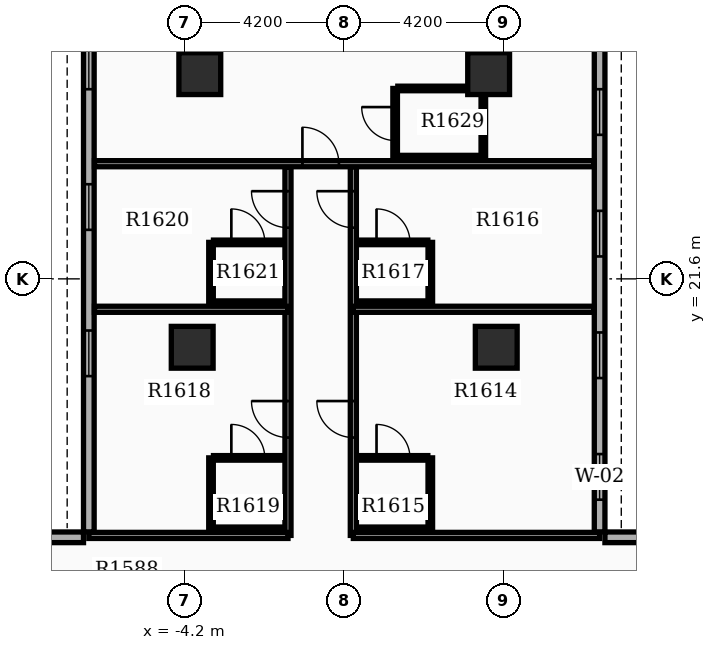
"""IFC4 building model, lengths in metres.
Left out: names, types, materials, properties, quantities, classifications, styles, units other than length and angle.
Written with IfcOpenShell. Run it as: python <this file> out.ifc"""

import sys

from ifc_helpers import new_model, si_unit, direction, frame, frame_2d, origin, origin_2d, place, context, subcontext, project, spatial, rectangle, extrude, element, fill, save


model = new_model("IFC4")
c1 = context("Model", 3, precision=1e-05, world=origin(), true_north=direction((0.0, 1.0)))
c2 = subcontext(c1, "Body", "Model", "MODEL_VIEW")
j1 = project(units=[si_unit("LENGTHUNIT", "METRE"), si_unit("PLANEANGLEUNIT", "RADIAN")], contexts=[c1])
p1 = place(None, origin())
s1 = spatial("IfcSite", under=j1, at=p1, CompositionType="ELEMENT")
p2 = place(p1, origin())
s2 = spatial("IfcBuilding", under=s1, at=p2, CompositionType="ELEMENT")
p3 = place(p2, frame((0.0, 0.0, 104.7)))
s3 = spatial("IfcBuildingStorey", under=s2, at=p3, CompositionType="ELEMENT", Elevation=104.7)
for number, where, z_axis, x_axis in (
    (1, (-4.0, 19.8, 0.0), (0.0, 0.0, 1.0), (1.0, 0.0, 0.0)),
    (2, (4.0, 19.8, 0.0), (0.0, 0.0, 1.0), (1.0, 0.0, 0.0)),
    (3, (-3.8, 27.0, 0.0), (0.0, 0.0, 1.0), (1.0, 0.0, 0.0)),
    (4, (3.8, 27.0, 0.0), (0.0, 0.0, 1.0), (1.0, 0.0, 0.0)),
):
    element("IfcColumn", number, at=place(p3, frame(where, z_axis=z_axis, x_axis=x_axis)), inside=s3, PredefinedType="COLUMN", context=c2, shape_type="SweptSolid", body=[
        extrude(rectangle(XDim=1.1, YDim=1.1, at=origin_2d()), origin(), (0.0, 0.0, 1.0), 3.9),
    ])
p4 = place(p3, frame((6.72, 14.94, 0.0), z_axis=(0.0, 0.0, 1.0), x_axis=(0.0, 1.0, 0.0)))
e5 = element("IfcWall", 5, at=p4, inside=s3, PredefinedType="STANDARD", context=c2, shape_type="SweptSolid", body=[
    extrude(rectangle(XDim=20.1, YDim=0.28, at=frame_2d((10.05, 0.0))), origin(), (0.0, 0.0, 1.0), 2.97),
])
p5 = place(p4, frame((0.85, 0.0, 0.8)))
e6 = element("IfcOpeningElement", 6, at=p5, cuts=e5, PredefinedType="OPENING", context=c2, shape_type="SweptSolid", body=[
    extrude(rectangle(XDim=1.2, YDim=1.6, at=frame_2d((0.6, 0.8))), frame((0.0, 0.15, 0.0), z_axis=(0.0, -1.0, 0.0), x_axis=(1.0, 0.0, 0.0)), (0.0, 0.0, 1.0), 0.3),
])
p6 = place(p4, frame((4.05, 0.0, 0.8)))
e7 = element("IfcOpeningElement", 7, at=p6, cuts=e5, PredefinedType="OPENING", context=c2, shape_type="SweptSolid", body=[
    extrude(rectangle(XDim=1.2, YDim=1.6, at=frame_2d((0.6, 0.8))), frame((0.0, 0.15, 0.0), z_axis=(0.0, -1.0, 0.0), x_axis=(1.0, 0.0, 0.0)), (0.0, 0.0, 1.0), 0.3),
])
p7 = place(p4, frame((7.25, 0.0, 0.8)))
e8 = element("IfcOpeningElement", 8, at=p7, cuts=e5, PredefinedType="OPENING", context=c2, shape_type="SweptSolid", body=[
    extrude(rectangle(XDim=1.2, YDim=1.6, at=frame_2d((0.6, 0.8))), frame((0.0, 0.15, 0.0), z_axis=(0.0, -1.0, 0.0), x_axis=(1.0, 0.0, 0.0)), (0.0, 0.0, 1.0), 0.3),
])
p8 = place(p4, frame((10.45, 0.0, 0.8)))
e9 = element("IfcOpeningElement", 9, at=p8, cuts=e5, PredefinedType="OPENING", context=c2, shape_type="SweptSolid", body=[
    extrude(rectangle(XDim=1.2, YDim=1.6, at=frame_2d((0.6, 0.8))), frame((0.0, 0.15, 0.0), z_axis=(0.0, -1.0, 0.0), x_axis=(1.0, 0.0, 0.0)), (0.0, 0.0, 1.0), 0.3),
])
p9 = place(p3, frame((-6.72, 35.04, 0.0), z_axis=(0.0, 0.0, 1.0), x_axis=(0.0, -1.0, 0.0)))
e10 = element("IfcWall", 10, at=p9, inside=s3, PredefinedType="STANDARD", context=c2, shape_type="SweptSolid", body=[
    extrude(rectangle(XDim=20.1, YDim=0.28, at=frame_2d((10.05, 0.0))), origin(), (0.0, 0.0, 1.0), 2.97),
])
p10 = place(p9, frame((0.85, 0.0, 0.8)))
e11 = element("IfcOpeningElement", 11, at=p10, cuts=e10, PredefinedType="OPENING", context=c2, shape_type="SweptSolid", body=[
    extrude(rectangle(XDim=1.2, YDim=1.6, at=frame_2d((0.6, 0.8))), frame((0.0, 0.15, 0.0), z_axis=(0.0, -1.0, 0.0), x_axis=(1.0, 0.0, 0.0)), (0.0, 0.0, 1.0), 0.3),
])
p11 = place(p9, frame((4.05, 0.0, 0.8)))
e12 = element("IfcOpeningElement", 12, at=p11, cuts=e10, PredefinedType="OPENING", context=c2, shape_type="SweptSolid", body=[
    extrude(rectangle(XDim=1.2, YDim=1.6, at=frame_2d((0.6, 0.8))), frame((0.0, 0.15, 0.0), z_axis=(0.0, -1.0, 0.0), x_axis=(1.0, 0.0, 0.0)), (0.0, 0.0, 1.0), 0.3),
])
p12 = place(p9, frame((7.25, 0.0, 0.8)))
e13 = element("IfcOpeningElement", 13, at=p12, cuts=e10, PredefinedType="OPENING", context=c2, shape_type="SweptSolid", body=[
    extrude(rectangle(XDim=1.2, YDim=1.6, at=frame_2d((0.6, 0.8))), frame((0.0, 0.15, 0.0), z_axis=(0.0, -1.0, 0.0), x_axis=(1.0, 0.0, 0.0)), (0.0, 0.0, 1.0), 0.3),
])
p13 = place(p9, frame((10.95, 0.0, 0.8)))
e14 = element("IfcOpeningElement", 14, at=p13, cuts=e10, PredefinedType="OPENING", context=c2, shape_type="SweptSolid", body=[
    extrude(rectangle(XDim=1.2, YDim=1.6, at=frame_2d((0.6, 0.8))), frame((0.0, 0.15, 0.0), z_axis=(0.0, -1.0, 0.0), x_axis=(1.0, 0.0, 0.0)), (0.0, 0.0, 1.0), 0.3),
])
p14 = place(p9, frame((14.799, 0.0, 0.85)))
e15 = element("IfcOpeningElement", 15, at=p14, cuts=e10, PredefinedType="OPENING", context=c2, shape_type="SweptSolid", body=[
    extrude(rectangle(XDim=1.2, YDim=1.6, at=frame_2d((0.6, 0.8))), frame((0.0, 0.15, 0.0), z_axis=(0.0, -1.0, 0.0), x_axis=(1.0, 0.0, 0.0)), (0.0, 0.0, 1.0), 0.3),
])
for number, where, z_axis, x_axis in (
    (16, (13.16, 14.8, 0.0), (0.0, 0.0, 1.0), (-1.0, 0.0, 0.0)),
    (17, (-13.16, 14.8, 0.0), (0.0, 0.0, 1.0), (1.0, 0.0, 0.0)),
):
    element("IfcWall", number, at=place(p3, frame(where, z_axis=z_axis, x_axis=x_axis)), inside=s3, PredefinedType="STANDARD", context=c2, shape_type="SweptSolid", body=[
        extrude(rectangle(XDim=6.3, YDim=0.28, at=frame_2d((3.15, 0.0))), origin(), (0.0, 0.0, 1.0), 2.97),
    ])
p15 = place(p3, frame((0.24, 14.85, 0.0), z_axis=(0.0, 0.0, 1.0), x_axis=(0.0, 1.0, 0.0)))
e18 = element("IfcWall", 18, at=p15, inside=s3, PredefinedType="PARTITIONING", context=c2, shape_type="SweptSolid", body=[
    extrude(rectangle(XDim=9.7, YDim=0.16, at=frame_2d((4.85, 0.0))), origin(), (0.0, 0.0, 1.0), 2.96),
])
p16 = place(p15, frame((2.575, 0.0, 0.0)))
e19 = element("IfcOpeningElement", 19, at=p16, cuts=e18, PredefinedType="OPENING", context=c2, shape_type="SweptSolid", body=[
    extrude(rectangle(XDim=0.96, YDim=2.15, at=frame_2d((0.48, 1.075))), frame((0.0, 0.09, 0.0), z_axis=(0.0, -1.0, 0.0), x_axis=(1.0, 0.0, 0.0)), (0.0, 0.0, 1.0), 0.18),
])
p17 = place(p15, frame((8.097, 0.0, 0.0)))
e20 = element("IfcOpeningElement", 20, at=p17, cuts=e18, PredefinedType="OPENING", context=c2, shape_type="SweptSolid", body=[
    extrude(rectangle(XDim=0.96, YDim=2.15, at=frame_2d((0.48, 1.075))), frame((0.0, 0.09, 0.0), z_axis=(0.0, -1.0, 0.0), x_axis=(1.0, 0.0, 0.0)), (0.0, 0.0, 1.0), 0.18),
])
p18 = place(p3, frame((0.24, 14.85, 0.0), z_axis=(0.0, 0.0, 1.0), x_axis=(1.0, 0.0, 0.0)))
e21 = element("IfcWall", 21, at=p18, inside=s3, PredefinedType="PARTITIONING", context=c2, shape_type="SweptSolid", body=[
    extrude(rectangle(XDim=6.48, YDim=0.16, at=frame_2d((3.24, 0.0))), origin(), (0.0, 0.0, 1.0), 2.96),
])
p19 = place(p3, frame((0.24, 20.8, 0.0), z_axis=(0.0, 0.0, 1.0), x_axis=(1.0, 0.0, 0.0)))
e22 = element("IfcWall", 22, at=p19, inside=s3, PredefinedType="PARTITIONING", context=c2, shape_type="SweptSolid", body=[
    extrude(rectangle(XDim=6.332, YDim=0.16, at=frame_2d((3.166, 0.0))), origin(), (0.0, 0.0, 1.0), 2.96),
])
p20 = place(p3, frame((0.38, 16.89, 0.0), z_axis=(0.0, 0.0, 1.0), x_axis=(1.0, 0.0, 0.0)))
e23 = element("IfcWall", 23, at=p20, inside=s3, PredefinedType="PARTITIONING", context=c2, shape_type="SweptSolid", body=[
    extrude(rectangle(XDim=1.82, YDim=0.12, at=frame_2d((0.91, 0.0))), origin(), (0.0, 0.0, 1.0), 2.96),
])
p21 = place(p20, frame((0.47, 0.0, 0.0)))
e24 = element("IfcOpeningElement", 24, at=p21, cuts=e23, PredefinedType="OPENING", context=c2, shape_type="SweptSolid", body=[
    extrude(rectangle(XDim=0.88, YDim=2.1, at=frame_2d((0.44, 1.05))), frame((0.0, 0.07, 0.0), z_axis=(0.0, -1.0, 0.0), x_axis=(1.0, 0.0, 0.0)), (0.0, 0.0, 1.0), 0.14),
])
p22 = place(p3, frame((0.38, 15.01, 0.0), z_axis=(0.0, 0.0, 1.0), x_axis=(1.0, 0.0, 0.0)))
e25 = element("IfcWall", 25, at=p22, inside=s3, PredefinedType="PARTITIONING", context=c2, shape_type="SweptSolid", body=[
    extrude(rectangle(XDim=1.82, YDim=0.12, at=frame_2d((0.91, 0.0))), origin(), (0.0, 0.0, 1.0), 2.96),
])
p23 = place(p3, frame((2.265, 15.01, 0.0), z_axis=(0.0, 0.0, 1.0), x_axis=(0.0, 1.0, 0.0)))
e26 = element("IfcWall", 26, at=p23, inside=s3, PredefinedType="PARTITIONING", context=c2, shape_type="SweptSolid", body=[
    extrude(rectangle(XDim=1.88, YDim=0.12, at=frame_2d((0.94, 0.0))), origin(), (0.0, 0.0, 1.0), 2.96),
])
p24 = place(p3, frame((0.38, 22.56, 0.0), z_axis=(0.0, 0.0, 1.0), x_axis=(1.0, 0.0, 0.0)))
e27 = element("IfcWall", 27, at=p24, inside=s3, PredefinedType="PARTITIONING", context=c2, shape_type="SweptSolid", body=[
    extrude(rectangle(XDim=1.82, YDim=0.12, at=frame_2d((0.91, 0.0))), origin(), (0.0, 0.0, 1.0), 2.96),
])
p25 = place(p24, frame((0.47, 0.0, 0.0)))
e28 = element("IfcOpeningElement", 28, at=p25, cuts=e27, PredefinedType="OPENING", context=c2, shape_type="SweptSolid", body=[
    extrude(rectangle(XDim=0.88, YDim=2.1, at=frame_2d((0.44, 1.05))), frame((0.0, 0.07, 0.0), z_axis=(0.0, -1.0, 0.0), x_axis=(1.0, 0.0, 0.0)), (0.0, 0.0, 1.0), 0.14),
])
p26 = place(p3, frame((0.38, 20.96, 0.0), z_axis=(0.0, 0.0, 1.0), x_axis=(1.0, 0.0, 0.0)))
e29 = element("IfcWall", 29, at=p26, inside=s3, PredefinedType="PARTITIONING", context=c2, shape_type="SweptSolid", body=[
    extrude(rectangle(XDim=1.82, YDim=0.12, at=frame_2d((0.91, 0.0))), origin(), (0.0, 0.0, 1.0), 2.96),
])
p27 = place(p3, frame((2.265, 20.96, 0.0), z_axis=(0.0, 0.0, 1.0), x_axis=(0.0, 1.0, 0.0)))
e30 = element("IfcWall", 30, at=p27, inside=s3, PredefinedType="PARTITIONING", context=c2, shape_type="SweptSolid", body=[
    extrude(rectangle(XDim=1.6, YDim=0.12, at=frame_2d((0.8, 0.0))), origin(), (0.0, 0.0, 1.0), 2.96),
])
p28 = place(p3, frame((-1.48, 14.85, 0.0), z_axis=(0.0, 0.0, 1.0), x_axis=(0.0, 1.0, 0.0)))
e31 = element("IfcWall", 31, at=p28, inside=s3, PredefinedType="PARTITIONING", context=c2, shape_type="SweptSolid", body=[
    extrude(rectangle(XDim=9.7, YDim=0.16, at=frame_2d((4.85, 0.0))), origin(), (0.0, 0.0, 1.0), 2.96),
])
p29 = place(p28, frame((2.575, 0.0, 0.0)))
e32 = element("IfcOpeningElement", 32, at=p29, cuts=e31, PredefinedType="OPENING", context=c2, shape_type="SweptSolid", body=[
    extrude(rectangle(XDim=0.96, YDim=2.15, at=frame_2d((0.48, 1.075))), frame((0.0, 0.09, 0.0), z_axis=(0.0, -1.0, 0.0), x_axis=(1.0, 0.0, 0.0)), (0.0, 0.0, 1.0), 0.18),
])
p30 = place(p28, frame((8.097, 0.0, 0.0)))
e33 = element("IfcOpeningElement", 33, at=p30, cuts=e31, PredefinedType="OPENING", context=c2, shape_type="SweptSolid", body=[
    extrude(rectangle(XDim=0.96, YDim=2.15, at=frame_2d((0.48, 1.075))), frame((0.0, 0.09, 0.0), z_axis=(0.0, -1.0, 0.0), x_axis=(1.0, 0.0, 0.0)), (0.0, 0.0, 1.0), 0.18),
])
p31 = place(p3, frame((-1.48, 14.85, 0.0), z_axis=(0.0, 0.0, 1.0), x_axis=(-1.0, 0.0, 0.0)))
e34 = element("IfcWall", 34, at=p31, inside=s3, PredefinedType="PARTITIONING", context=c2, shape_type="SweptSolid", body=[
    extrude(rectangle(XDim=5.24, YDim=0.16, at=frame_2d((2.62, 0.0))), origin(), (0.0, 0.0, 1.0), 2.96),
])
p32 = place(p3, frame((-1.48, 20.8, 0.0), z_axis=(0.0, 0.0, 1.0), x_axis=(-1.0, 0.0, 0.0)))
e35 = element("IfcWall", 35, at=p32, inside=s3, PredefinedType="PARTITIONING", context=c2, shape_type="SweptSolid", body=[
    extrude(rectangle(XDim=5.092, YDim=0.16, at=frame_2d((2.546, 0.0))), origin(), (0.0, 0.0, 1.0), 2.96),
])
p33 = place(p3, frame((-3.44, 16.89, 0.0), z_axis=(0.0, 0.0, 1.0), x_axis=(1.0, 0.0, 0.0)))
e36 = element("IfcWall", 36, at=p33, inside=s3, PredefinedType="PARTITIONING", context=c2, shape_type="SweptSolid", body=[
    extrude(rectangle(XDim=1.82, YDim=0.12, at=frame_2d((0.91, 0.0))), origin(), (0.0, 0.0, 1.0), 2.96),
])
p34 = place(p33, frame((0.47, 0.0, 0.0)))
e37 = element("IfcOpeningElement", 37, at=p34, cuts=e36, PredefinedType="OPENING", context=c2, shape_type="SweptSolid", body=[
    extrude(rectangle(XDim=0.88, YDim=2.1, at=frame_2d((0.44, 1.05))), frame((0.0, 0.07, 0.0), z_axis=(0.0, -1.0, 0.0), x_axis=(1.0, 0.0, 0.0)), (0.0, 0.0, 1.0), 0.14),
])
p35 = place(p3, frame((-3.44, 15.01, 0.0), z_axis=(0.0, 0.0, 1.0), x_axis=(1.0, 0.0, 0.0)))
e38 = element("IfcWall", 38, at=p35, inside=s3, PredefinedType="PARTITIONING", context=c2, shape_type="SweptSolid", body=[
    extrude(rectangle(XDim=1.82, YDim=0.12, at=frame_2d((0.91, 0.0))), origin(), (0.0, 0.0, 1.0), 2.96),
])
p36 = place(p3, frame((-3.505, 15.01, 0.0), z_axis=(0.0, 0.0, 1.0), x_axis=(0.0, 1.0, 0.0)))
e39 = element("IfcWall", 39, at=p36, inside=s3, PredefinedType="PARTITIONING", context=c2, shape_type="SweptSolid", body=[
    extrude(rectangle(XDim=1.88, YDim=0.12, at=frame_2d((0.94, 0.0))), origin(), (0.0, 0.0, 1.0), 2.96),
])
p37 = place(p3, frame((-3.44, 22.56, 0.0), z_axis=(0.0, 0.0, 1.0), x_axis=(1.0, 0.0, 0.0)))
e40 = element("IfcWall", 40, at=p37, inside=s3, PredefinedType="PARTITIONING", context=c2, shape_type="SweptSolid", body=[
    extrude(rectangle(XDim=1.82, YDim=0.12, at=frame_2d((0.91, 0.0))), origin(), (0.0, 0.0, 1.0), 2.96),
])
p38 = place(p37, frame((0.47, 0.0, 0.0)))
e41 = element("IfcOpeningElement", 41, at=p38, cuts=e40, PredefinedType="OPENING", context=c2, shape_type="SweptSolid", body=[
    extrude(rectangle(XDim=0.88, YDim=2.1, at=frame_2d((0.44, 1.05))), frame((0.0, 0.07, 0.0), z_axis=(0.0, -1.0, 0.0), x_axis=(1.0, 0.0, 0.0)), (0.0, 0.0, 1.0), 0.14),
])
p39 = place(p3, frame((-3.44, 20.96, 0.0), z_axis=(0.0, 0.0, 1.0), x_axis=(1.0, 0.0, 0.0)))
e42 = element("IfcWall", 42, at=p39, inside=s3, PredefinedType="PARTITIONING", context=c2, shape_type="SweptSolid", body=[
    extrude(rectangle(XDim=1.82, YDim=0.12, at=frame_2d((0.91, 0.0))), origin(), (0.0, 0.0, 1.0), 2.96),
])
p40 = place(p3, frame((-3.505, 20.96, 0.0), z_axis=(0.0, 0.0, 1.0), x_axis=(0.0, 1.0, 0.0)))
e43 = element("IfcWall", 43, at=p40, inside=s3, PredefinedType="PARTITIONING", context=c2, shape_type="SweptSolid", body=[
    extrude(rectangle(XDim=1.6, YDim=0.12, at=frame_2d((0.8, 0.0))), origin(), (0.0, 0.0, 1.0), 2.96),
])
p41 = place(p3, frame((-6.572, 24.63, 0.0), z_axis=(0.0, 0.0, 1.0), x_axis=(1.0, 0.0, 0.0)))
e44 = element("IfcWall", 44, at=p41, inside=s3, PredefinedType="PARTITIONING", context=c2, shape_type="SweptSolid", body=[
    extrude(rectangle(XDim=13.144, YDim=0.16, at=frame_2d((6.572, 0.0))), origin(), (0.0, 0.0, 1.0), 2.96),
])
p42 = place(p41, frame((5.472, 0.0, 0.0)))
e45 = element("IfcOpeningElement", 45, at=p42, cuts=e44, PredefinedType="OPENING", context=c2, shape_type="SweptSolid", body=[
    extrude(rectangle(XDim=0.96, YDim=2.15, at=frame_2d((0.48, 1.075))), frame((0.0, 0.09, 0.0), z_axis=(0.0, -1.0, 0.0), x_axis=(1.0, 0.0, 0.0)), (0.0, 0.0, 1.0), 0.18),
])
p43 = place(p3, frame((1.34, 24.79, 0.0), z_axis=(0.0, 0.0, 1.0), x_axis=(0.0, 1.0, 0.0)))
e46 = element("IfcWall", 46, at=p43, inside=s3, PredefinedType="PARTITIONING", context=c2, shape_type="SweptSolid", body=[
    extrude(rectangle(XDim=1.82, YDim=0.12, at=frame_2d((0.91, 0.0))), origin(), (0.0, 0.0, 1.0), 2.96),
])
p44 = place(p43, frame((0.45, 0.0, 0.0)))
e47 = element("IfcOpeningElement", 47, at=p44, cuts=e46, PredefinedType="OPENING", context=c2, shape_type="SweptSolid", body=[
    extrude(rectangle(XDim=0.88, YDim=2.1, at=frame_2d((0.44, 1.05))), frame((0.0, 0.07, 0.0), z_axis=(0.0, -1.0, 0.0), x_axis=(1.0, 0.0, 0.0)), (0.0, 0.0, 1.0), 0.14),
])
p45 = place(p3, frame((3.66, 24.79, 0.0), z_axis=(0.0, 0.0, 1.0), x_axis=(0.0, 1.0, 0.0)))
e48 = element("IfcWall", 48, at=p45, inside=s3, PredefinedType="PARTITIONING", context=c2, shape_type="SweptSolid", body=[
    extrude(rectangle(XDim=1.82, YDim=0.12, at=frame_2d((0.91, 0.0))), origin(), (0.0, 0.0, 1.0), 2.96),
])
for number, where, z_axis, x_axis in (
    (49, (1.41, 24.79, 0.0), (0.0, 0.0, 1.0), (1.0, 0.0, 0.0)),
    (50, (1.41, 26.61, 0.0), (0.0, 0.0, 1.0), (1.0, 0.0, 0.0)),
):
    element("IfcWall", number, at=place(p3, frame(where, z_axis=z_axis, x_axis=x_axis)), inside=s3, PredefinedType="PARTITIONING", context=c2, shape_type="SweptSolid", body=[
        extrude(rectangle(XDim=2.18, YDim=0.12, at=frame_2d((1.09, 0.0))), origin(), (0.0, 0.0, 1.0), 2.96),
    ])
p46 = place(p5, origin())
e51 = element("IfcWindow", 51, at=p46, inside=s3, PartitioningType="SINGLE_PANEL", PredefinedType="WINDOW", context=c2, shape_type="SweptSolid", body=[
    extrude(rectangle(XDim=1.2, YDim=1.6, at=frame_2d((0.6, 0.8))), frame((0.0, 0.03, 0.0), z_axis=(0.0, -1.0, 0.0), x_axis=(1.0, 0.0, 0.0)), (0.0, 0.0, 1.0), 0.06),
])
fill(e6, e51)
p47 = place(p6, origin())
e52 = element("IfcWindow", 52, at=p47, inside=s3, PartitioningType="SINGLE_PANEL", PredefinedType="WINDOW", context=c2, shape_type="SweptSolid", body=[
    extrude(rectangle(XDim=1.2, YDim=1.6, at=frame_2d((0.6, 0.8))), frame((0.0, 0.03, 0.0), z_axis=(0.0, -1.0, 0.0), x_axis=(1.0, 0.0, 0.0)), (0.0, 0.0, 1.0), 0.06),
])
fill(e7, e52)
p48 = place(p7, origin())
e53 = element("IfcWindow", 53, at=p48, inside=s3, PartitioningType="SINGLE_PANEL", PredefinedType="WINDOW", context=c2, shape_type="SweptSolid", body=[
    extrude(rectangle(XDim=1.2, YDim=1.6, at=frame_2d((0.6, 0.8))), frame((0.0, 0.03, 0.0), z_axis=(0.0, -1.0, 0.0), x_axis=(1.0, 0.0, 0.0)), (0.0, 0.0, 1.0), 0.06),
])
fill(e8, e53)
p49 = place(p8, origin())
e54 = element("IfcWindow", 54, at=p49, inside=s3, PartitioningType="SINGLE_PANEL", PredefinedType="WINDOW", context=c2, shape_type="SweptSolid", body=[
    extrude(rectangle(XDim=1.2, YDim=1.6, at=frame_2d((0.6, 0.8))), frame((0.0, 0.03, 0.0), z_axis=(0.0, -1.0, 0.0), x_axis=(1.0, 0.0, 0.0)), (0.0, 0.0, 1.0), 0.06),
])
fill(e9, e54)
p50 = place(p12, origin())
e55 = element("IfcWindow", 55, at=p50, inside=s3, PartitioningType="SINGLE_PANEL", PredefinedType="WINDOW", context=c2, shape_type="SweptSolid", body=[
    extrude(rectangle(XDim=1.2, YDim=1.6, at=frame_2d((0.6, 0.8))), frame((0.0, 0.03, 0.0), z_axis=(0.0, -1.0, 0.0), x_axis=(1.0, 0.0, 0.0)), (0.0, 0.0, 1.0), 0.06),
])
fill(e13, e55)
p51 = place(p13, origin())
e56 = element("IfcWindow", 56, at=p51, inside=s3, PartitioningType="SINGLE_PANEL", PredefinedType="WINDOW", context=c2, shape_type="SweptSolid", body=[
    extrude(rectangle(XDim=1.2, YDim=1.6, at=frame_2d((0.6, 0.8))), frame((0.0, 0.03, 0.0), z_axis=(0.0, -1.0, 0.0), x_axis=(1.0, 0.0, 0.0)), (0.0, 0.0, 1.0), 0.06),
])
fill(e14, e56)
p52 = place(p14, origin())
e57 = element("IfcWindow", 57, at=p52, inside=s3, PartitioningType="SINGLE_PANEL", PredefinedType="WINDOW", context=c2, shape_type="SweptSolid", body=[
    extrude(rectangle(XDim=1.2, YDim=1.6, at=frame_2d((0.6, 0.8))), frame((0.0, 0.03, 0.0), z_axis=(0.0, -1.0, 0.0), x_axis=(1.0, 0.0, 0.0)), (0.0, 0.0, 1.0), 0.06),
])
fill(e15, e57)
p53 = place(p16, origin())
e58 = element("IfcDoor", 58, at=p53, inside=s3, OperationType="SINGLE_SWING_RIGHT", PredefinedType="DOOR", context=c2, shape_type="SweptSolid", body=[
    extrude(rectangle(XDim=0.96, YDim=2.15, at=frame_2d((0.48, 1.075))), frame((0.0, 0.025, 0.0), z_axis=(0.0, -1.0, 0.0), x_axis=(1.0, 0.0, 0.0)), (0.0, 0.0, 1.0), 0.05),
])
fill(e19, e58)
p54 = place(p21, origin())
e59 = element("IfcDoor", 59, at=p54, inside=s3, OperationType="SINGLE_SWING_LEFT", PredefinedType="DOOR", context=c2, shape_type="SweptSolid", body=[
    extrude(rectangle(XDim=0.88, YDim=2.1, at=frame_2d((0.44, 1.05))), frame((0.0, 0.025, 0.0), z_axis=(0.0, -1.0, 0.0), x_axis=(1.0, 0.0, 0.0)), (0.0, 0.0, 1.0), 0.05),
])
fill(e24, e59)
p55 = place(p17, origin())
e60 = element("IfcDoor", 60, at=p55, inside=s3, OperationType="SINGLE_SWING_RIGHT", PredefinedType="DOOR", context=c2, shape_type="SweptSolid", body=[
    extrude(rectangle(XDim=0.96, YDim=2.15, at=frame_2d((0.48, 1.075))), frame((0.0, 0.025, 0.0), z_axis=(0.0, -1.0, 0.0), x_axis=(1.0, 0.0, 0.0)), (0.0, 0.0, 1.0), 0.05),
])
fill(e20, e60)
p56 = place(p25, origin())
e61 = element("IfcDoor", 61, at=p56, inside=s3, OperationType="SINGLE_SWING_LEFT", PredefinedType="DOOR", context=c2, shape_type="SweptSolid", body=[
    extrude(rectangle(XDim=0.88, YDim=2.1, at=frame_2d((0.44, 1.05))), frame((0.0, 0.025, 0.0), z_axis=(0.0, -1.0, 0.0), x_axis=(1.0, 0.0, 0.0)), (0.0, 0.0, 1.0), 0.05),
])
fill(e28, e61)
p57 = place(p29, origin())
e62 = element("IfcDoor", 62, at=p57, inside=s3, OperationType="SINGLE_SWING_RIGHT", PredefinedType="DOOR", context=c2, shape_type="SweptSolid", body=[
    extrude(rectangle(XDim=0.96, YDim=2.15, at=frame_2d((0.48, 1.075))), frame((0.0, 0.025, 0.0), z_axis=(0.0, -1.0, 0.0), x_axis=(1.0, 0.0, 0.0)), (0.0, 0.0, 1.0), 0.05),
])
fill(e32, e62)
p58 = place(p34, origin())
e63 = element("IfcDoor", 63, at=p58, inside=s3, OperationType="SINGLE_SWING_LEFT", PredefinedType="DOOR", context=c2, shape_type="SweptSolid", body=[
    extrude(rectangle(XDim=0.88, YDim=2.1, at=frame_2d((0.44, 1.05))), frame((0.0, 0.025, 0.0), z_axis=(0.0, -1.0, 0.0), x_axis=(1.0, 0.0, 0.0)), (0.0, 0.0, 1.0), 0.05),
])
fill(e37, e63)
p59 = place(p30, origin())
e64 = element("IfcDoor", 64, at=p59, inside=s3, OperationType="SINGLE_SWING_RIGHT", PredefinedType="DOOR", context=c2, shape_type="SweptSolid", body=[
    extrude(rectangle(XDim=0.96, YDim=2.15, at=frame_2d((0.48, 1.075))), frame((0.0, 0.025, 0.0), z_axis=(0.0, -1.0, 0.0), x_axis=(1.0, 0.0, 0.0)), (0.0, 0.0, 1.0), 0.05),
])
fill(e33, e64)
p60 = place(p38, origin())
e65 = element("IfcDoor", 65, at=p60, inside=s3, OperationType="SINGLE_SWING_LEFT", PredefinedType="DOOR", context=c2, shape_type="SweptSolid", body=[
    extrude(rectangle(XDim=0.88, YDim=2.1, at=frame_2d((0.44, 1.05))), frame((0.0, 0.025, 0.0), z_axis=(0.0, -1.0, 0.0), x_axis=(1.0, 0.0, 0.0)), (0.0, 0.0, 1.0), 0.05),
])
fill(e41, e65)
p61 = place(p42, origin())
e66 = element("IfcDoor", 66, at=p61, inside=s3, OperationType="SINGLE_SWING_LEFT", PredefinedType="DOOR", context=c2, shape_type="SweptSolid", body=[
    extrude(rectangle(XDim=0.96, YDim=2.15, at=frame_2d((0.48, 1.075))), frame((0.0, 0.025, 0.0), z_axis=(0.0, -1.0, 0.0), x_axis=(1.0, 0.0, 0.0)), (0.0, 0.0, 1.0), 0.05),
])
fill(e45, e66)
p62 = place(p44, origin())
e67 = element("IfcDoor", 67, at=p62, inside=s3, OperationType="SINGLE_SWING_RIGHT", PredefinedType="DOOR", context=c2, shape_type="SweptSolid", body=[
    extrude(rectangle(XDim=0.88, YDim=2.1, at=frame_2d((0.44, 1.05))), frame((0.0, 0.025, 0.0), z_axis=(0.0, -1.0, 0.0), x_axis=(1.0, 0.0, 0.0)), (0.0, 0.0, 1.0), 0.05),
])
fill(e47, e67)
save(model, sys.argv[1])
